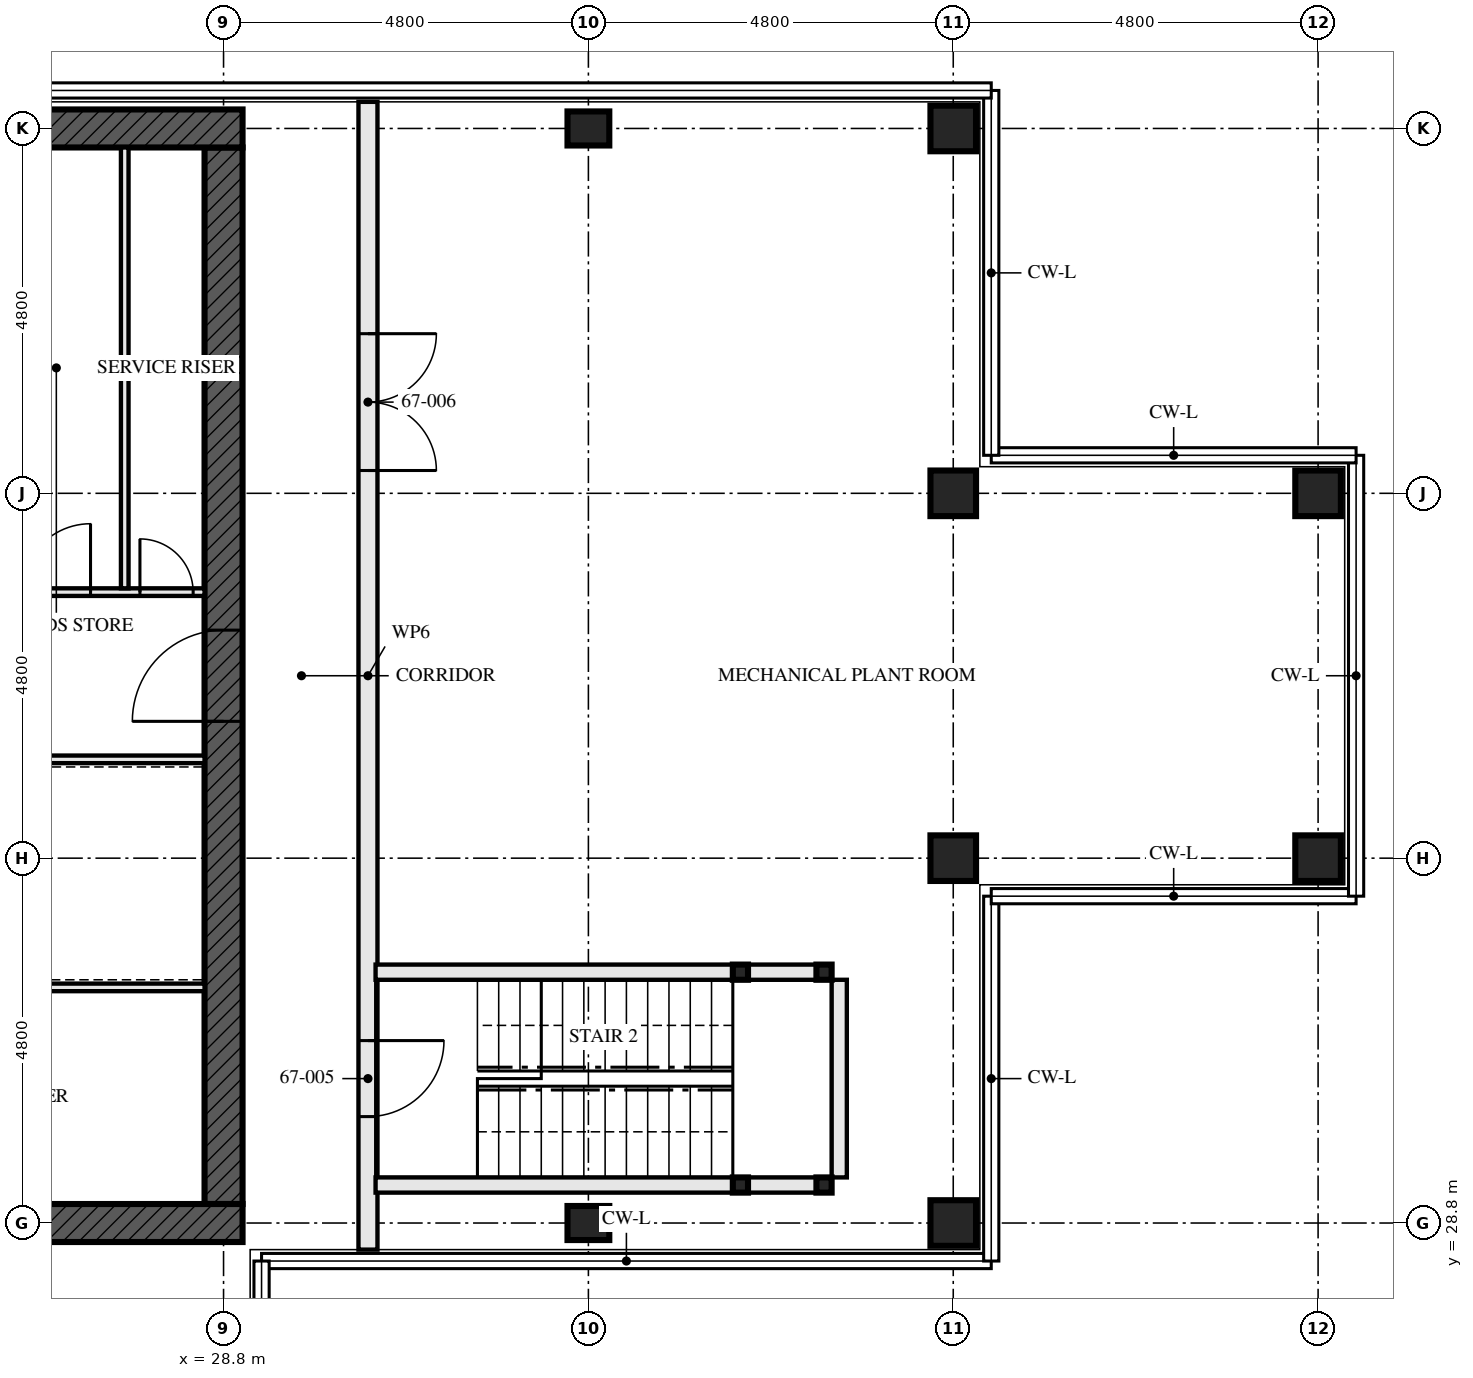
"""IFC4 building model, lengths in metres.
Left out: names, types, materials, properties, quantities, classifications, styles, units other than length and angle.
Written with IfcOpenShell. Run it as: python <this file> out.ifc"""

import sys

from ifc_helpers import new_model, si_unit, direction, frame, frame_2d, origin, origin_2d, place, context, subcontext, project, spatial, rectangle, hollow_rectangle, i_section, extrude, element, fill, save


model = new_model("IFC4")
c1 = context("Model", 3, precision=1e-05, world=origin(), true_north=direction((0.0, 1.0)))
c2 = subcontext(c1, "Body", "Model", "MODEL_VIEW")
j1 = project(units=[si_unit("LENGTHUNIT", "METRE"), si_unit("PLANEANGLEUNIT", "RADIAN")], contexts=[c1])
p1 = place(None, origin())
s1 = spatial("IfcSite", under=j1, at=p1, CompositionType="ELEMENT")
p2 = place(p1, origin())
s2 = spatial("IfcBuilding", under=s1, at=p2, CompositionType="ELEMENT")
p3 = place(p2, frame((0.0, 0.0, 243.5)))
s3 = spatial("IfcBuildingStorey", under=s2, at=p3, CompositionType="ELEMENT", Elevation=243.5)
for number, where, z_axis, x_axis in (
    (1, (33.6, 28.8, 0.0), (0.0, 0.0, 1.0), (0.0, 1.0, 0.0)),
    (2, (33.6, 43.2, 0.0), (0.0, 0.0, 1.0), (0.0, 1.0, 0.0)),
):
    element("IfcColumn", number, at=place(p3, frame(where, z_axis=z_axis, x_axis=x_axis)), inside=s3, PredefinedType="COLUMN", context=c2, shape_type="SweptSolid", body=[
        extrude(i_section(OverallWidth=0.448, OverallDepth=0.55, WebThickness=0.072, FlangeThickness=0.115, FilletRadius=0.015, at=origin_2d()), origin(), (0.0, 0.0, 1.0), 4.5),
    ])
for number, where, z_axis, x_axis in (
    (3, (38.4, 28.8, 0.0), (0.0, 0.0, 1.0), (0.0, 1.0, 0.0)),
    (4, (38.4, 33.6, 0.0), (0.0, 0.0, 1.0), (0.0, 1.0, 0.0)),
    (5, (38.4, 38.4, 0.0), (0.0, 0.0, 1.0), (0.0, 1.0, 0.0)),
    (6, (38.4, 43.2, 0.0), (0.0, 0.0, 1.0), (0.0, 1.0, 0.0)),
    (7, (43.2, 33.6, 0.0), (0.0, 0.0, 1.0), (0.0, 1.0, 0.0)),
    (8, (43.2, 38.4, 0.0), (0.0, 0.0, 1.0), (0.0, 1.0, 0.0)),
):
    element("IfcColumn", number, at=place(p3, frame(where, z_axis=z_axis, x_axis=x_axis)), inside=s3, PredefinedType="COLUMN", context=c2, shape_type="SweptSolid", body=[
        extrude(hollow_rectangle(XDim=0.6, YDim=0.6, WallThickness=0.05, at=origin_2d()), origin(), (0.0, 0.0, 1.0), 4.5),
    ])
p4 = place(p3, frame((14.15, 28.8, -0.25), z_axis=(0.0, 0.0, 1.0), x_axis=(1.0, 0.0, 0.0)))
e9 = element("IfcWall", 9, at=p4, inside=s3, PredefinedType="SHEAR", context=c2, shape_type="SweptSolid", body=[
    extrude(rectangle(XDim=14.9, YDim=0.5, at=frame_2d((7.45, 0.0))), origin(), (0.0, 0.0, 1.0), 4.5),
])
p5 = place(p4, frame((6.85, 0.0, 0.25)))
e10 = element("IfcOpeningElement", 10, at=p5, cuts=e9, PredefinedType="OPENING", context=c2, shape_type="SweptSolid", body=[
    extrude(rectangle(XDim=1.2, YDim=2.1, at=frame_2d((0.6, 1.05))), frame((0.0, 0.26, 0.0), z_axis=(0.0, -1.0, 0.0), x_axis=(1.0, 0.0, 0.0)), (0.0, 0.0, 1.0), 0.521),
])
p6 = place(p3, frame((29.05, 43.2, -0.25), z_axis=(0.0, 0.0, 1.0), x_axis=(-1.0, 0.0, 0.0)))
e11 = element("IfcWall", 11, at=p6, inside=s3, PredefinedType="SHEAR", context=c2, shape_type="SweptSolid", body=[
    extrude(rectangle(XDim=14.9, YDim=0.5, at=frame_2d((7.45, 0.0))), origin(), (0.0, 0.0, 1.0), 4.5),
])
p7 = place(p3, frame((28.8, 29.05, -0.25), z_axis=(0.0, 0.0, 1.0), x_axis=(0.0, 1.0, 0.0)))
e12 = element("IfcWall", 12, at=p7, inside=s3, PredefinedType="SHEAR", context=c2, shape_type="SweptSolid", body=[
    extrude(rectangle(XDim=13.9, YDim=0.5, at=frame_2d((6.95, 0.0))), origin(), (0.0, 0.0, 1.0), 4.5),
])
p8 = place(p7, frame((6.35, 0.0, 0.25)))
e13 = element("IfcOpeningElement", 13, at=p8, cuts=e12, PredefinedType="OPENING", context=c2, shape_type="SweptSolid", body=[
    extrude(rectangle(XDim=1.2, YDim=2.1, at=frame_2d((0.6, 1.05))), frame((0.0, 0.26, 0.0), z_axis=(0.0, -1.0, 0.0), x_axis=(1.0, 0.0, 0.0)), (0.0, 0.0, 1.0), 0.521),
])
for number, where, z_axis, x_axis in (
    (14, (36.7, 29.3, 0.0), (0.0, 0.0, 1.0), (1.0, 0.0, 0.0)),
    (15, (36.7, 32.1, 0.0), (0.0, 0.0, 1.0), (1.0, 0.0, 0.0)),
    (16, (35.6, 29.3, 0.0), (0.0, 0.0, 1.0), (1.0, 0.0, 0.0)),
    (17, (35.6, 32.1, 0.0), (0.0, 0.0, 1.0), (1.0, 0.0, 0.0)),
):
    element("IfcColumn", number, at=place(p3, frame(where, z_axis=z_axis, x_axis=x_axis)), inside=s3, PredefinedType="COLUMN", context=c2, shape_type="SweptSolid", body=[
        extrude(hollow_rectangle(XDim=0.2, YDim=0.2, WallThickness=0.008, at=origin_2d()), origin(), (0.0, 0.0, 1.0), 4.25),
    ])
p9 = place(p3, frame((36.6, 29.3, 0.0), z_axis=(0.0, 0.0, 1.0), x_axis=(-1.0, 0.0, 0.0)))
e18 = element("IfcWall", 18, at=p9, inside=s3, PredefinedType="SOLIDWALL", context=c2, shape_type="SweptSolid", body=[
    extrude(rectangle(XDim=0.9, YDim=0.2, at=frame_2d((0.45, 0.0))), origin(), (0.0, 0.0, 1.0), 4.25),
])
p10 = place(p3, frame((35.5, 29.3, 0.0), z_axis=(0.0, 0.0, 1.0), x_axis=(-1.0, 0.0, 0.0)))
e19 = element("IfcWall", 19, at=p10, inside=s3, PredefinedType="SOLIDWALL", context=c2, shape_type="SweptSolid", body=[
    extrude(rectangle(XDim=4.7, YDim=0.2, at=frame_2d((2.35, 0.0))), origin(), (0.0, 0.0, 1.0), 4.25),
])
p11 = place(p3, frame((36.6, 32.1, 0.0), z_axis=(0.0, 0.0, 1.0), x_axis=(-1.0, 0.0, 0.0)))
e20 = element("IfcWall", 20, at=p11, inside=s3, PredefinedType="SOLIDWALL", context=c2, shape_type="SweptSolid", body=[
    extrude(rectangle(XDim=0.9, YDim=0.2, at=frame_2d((0.45, 0.0))), origin(), (0.0, 0.0, 1.0), 4.25),
])
p12 = place(p3, frame((35.5, 32.1, 0.0), z_axis=(0.0, 0.0, 1.0), x_axis=(-1.0, 0.0, 0.0)))
e21 = element("IfcWall", 21, at=p12, inside=s3, PredefinedType="SOLIDWALL", context=c2, shape_type="SweptSolid", body=[
    extrude(rectangle(XDim=4.7, YDim=0.2, at=frame_2d((2.35, 0.0))), origin(), (0.0, 0.0, 1.0), 4.25),
])
p13 = place(p3, frame((36.9, 29.4, 0.0), z_axis=(0.0, 0.0, 1.0), x_axis=(0.0, 1.0, 0.0)))
e22 = element("IfcWall", 22, at=p13, inside=s3, PredefinedType="SOLIDWALL", context=c2, shape_type="SweptSolid", body=[
    extrude(rectangle(XDim=2.6, YDim=0.2, at=frame_2d((1.3, 0.0))), origin(), (0.0, 0.0, 1.0), 4.25),
])
p14 = place(p3, frame((30.7, 28.45, 0.0), z_axis=(0.0, 0.0, 1.0), x_axis=(0.0, 1.0, 0.0)))
e23 = element("IfcWall", 23, at=p14, inside=s3, PredefinedType="SOLIDWALL", context=c2, shape_type="SweptSolid", body=[
    extrude(rectangle(XDim=15.1, YDim=0.25, at=frame_2d((7.55, 0.0))), origin(), (0.0, 0.0, 1.0), 3.232),
])
p15 = place(p14, frame((1.75, 0.0, 0.0)))
e24 = element("IfcOpeningElement", 24, at=p15, cuts=e23, PredefinedType="OPENING", context=c2, shape_type="SweptSolid", body=[
    extrude(rectangle(XDim=1.0, YDim=2.1, at=frame_2d((0.5, 1.05))), frame((0.0, 0.135, 0.0), z_axis=(0.0, -1.0, 0.0), x_axis=(1.0, 0.0, 0.0)), (0.0, 0.0, 1.0), 0.271),
])
p16 = place(p14, frame((10.25, 0.0, 0.0)))
e25 = element("IfcOpeningElement", 25, at=p16, cuts=e23, PredefinedType="OPENING", context=c2, shape_type="SweptSolid", body=[
    extrude(rectangle(XDim=1.8, YDim=2.4, at=frame_2d((0.9, 1.2))), frame((0.0, 0.135, 0.0), z_axis=(0.0, -1.0, 0.0), x_axis=(1.0, 0.0, 0.0)), (0.0, 0.0, 1.0), 0.271),
])
p17 = place(p3, frame((27.5, 37.15, 0.0), z_axis=(0.0, 0.0, 1.0), x_axis=(0.0, 1.0, 0.0)))
e26 = element("IfcWall", 26, at=p17, inside=s3, PredefinedType="SOLIDWALL", context=c2, shape_type="SweptSolid", body=[
    extrude(rectangle(XDim=5.8, YDim=0.1, at=frame_2d((2.9, 0.0))), origin(), (0.0, 0.0, 1.0), 4.25),
])
p18 = place(p3, frame((23.05, 34.9, 0.0), z_axis=(0.0, 0.0, 1.0), x_axis=(1.0, 0.0, 0.0)))
e27 = element("IfcWall", 27, at=p18, inside=s3, PredefinedType="SOLIDWALL", context=c2, shape_type="SweptSolid", body=[
    extrude(rectangle(XDim=5.5, YDim=0.1, at=frame_2d((2.75, 0.0))), origin(), (0.0, 0.0, 1.0), 4.25),
])
p19 = place(p3, frame((22.65, 37.1, 0.0), z_axis=(0.0, 0.0, 1.0), x_axis=(1.0, 0.0, 0.0)))
e28 = element("IfcWall", 28, at=p19, inside=s3, PredefinedType="SOLIDWALL", context=c2, shape_type="SweptSolid", body=[
    extrude(rectangle(XDim=5.9, YDim=0.1, at=frame_2d((2.95, 0.0))), origin(), (0.0, 0.0, 1.0), 4.25),
])
p20 = place(p19, frame((3.5, 0.0, 0.0)))
e29 = element("IfcOpeningElement", 29, at=p20, cuts=e28, PredefinedType="OPENING", context=c2, shape_type="SweptSolid", body=[
    extrude(rectangle(XDim=0.9, YDim=2.1, at=frame_2d((0.45, 1.05))), frame((0.0, 0.061, 0.0), z_axis=(0.0, -1.0, 0.0), x_axis=(1.0, 0.0, 0.0)), (0.0, 0.0, 1.0), 0.121),
])
p21 = place(p19, frame((5.05, 0.0, 0.0)))
e30 = element("IfcOpeningElement", 30, at=p21, cuts=e28, PredefinedType="OPENING", context=c2, shape_type="SweptSolid", body=[
    extrude(rectangle(XDim=0.7, YDim=2.1, at=frame_2d((0.35, 1.05))), frame((0.0, 0.061, 0.0), z_axis=(0.0, -1.0, 0.0), x_axis=(1.0, 0.0, 0.0)), (0.0, 0.0, 1.0), 0.121),
])
p22 = place(p3, frame((23.15, 31.9, 0.0), z_axis=(0.0, 0.0, 1.0), x_axis=(1.0, 0.0, 0.0)))
e31 = element("IfcWall", 31, at=p22, inside=s3, PredefinedType="SOLIDWALL", context=c2, shape_type="SweptSolid", body=[
    extrude(rectangle(XDim=5.4, YDim=0.1, at=frame_2d((2.7, 0.0))), origin(), (0.0, 0.0, 1.0), 4.25),
])
p23 = place(p15, frame((1.0, 0.0, 0.0), z_axis=(0.0, 0.0, 1.0), x_axis=(-1.0, 0.0, 0.0)))
e32 = element("IfcDoor", 32, at=p23, inside=s3, OperationType="SINGLE_SWING_RIGHT", PredefinedType="DOOR", context=c2, shape_type="SweptSolid", body=[
    extrude(rectangle(XDim=1.0, YDim=2.1, at=frame_2d((0.5, 1.05))), frame((0.0, 0.032, 0.0), z_axis=(0.0, -1.0, 0.0), x_axis=(1.0, 0.0, 0.0)), (0.0, 0.0, 1.0), 0.064),
])
fill(e24, e32)
p24 = place(p16, frame((1.8, 0.0, 0.0), z_axis=(0.0, 0.0, 1.0), x_axis=(-1.0, 0.0, 0.0)))
e33 = element("IfcDoor", 33, at=p24, inside=s3, OperationType="DOUBLE_DOOR_SINGLE_SWING", PredefinedType="DOOR", context=c2, shape_type="SweptSolid", body=[
    extrude(rectangle(XDim=1.8, YDim=2.4, at=frame_2d((0.9, 1.2))), frame((0.0, 0.032, 0.0), z_axis=(0.0, -1.0, 0.0), x_axis=(1.0, 0.0, 0.0)), (0.0, 0.0, 1.0), 0.064),
])
fill(e25, e33)
p25 = place(p20, origin())
e34 = element("IfcDoor", 34, at=p25, inside=s3, OperationType="SINGLE_SWING_LEFT", PredefinedType="DOOR", context=c2, shape_type="SweptSolid", body=[
    extrude(rectangle(XDim=0.9, YDim=2.1, at=frame_2d((0.45, 1.05))), frame((0.0, 0.027, 0.0), z_axis=(0.0, -1.0, 0.0), x_axis=(1.0, 0.0, 0.0)), (0.0, 0.0, 1.0), 0.054),
])
fill(e29, e34)
p26 = place(p21, origin())
e35 = element("IfcDoor", 35, at=p26, inside=s3, OperationType="SINGLE_SWING_RIGHT", PredefinedType="DOOR", context=c2, shape_type="SweptSolid", body=[
    extrude(rectangle(XDim=0.7, YDim=2.1, at=frame_2d((0.35, 1.05))), frame((0.0, 0.027, 0.0), z_axis=(0.0, -1.0, 0.0), x_axis=(1.0, 0.0, 0.0)), (0.0, 0.0, 1.0), 0.054),
])
fill(e30, e35)
p27 = place(p8, origin())
e36 = element("IfcDoor", 36, at=p27, inside=s3, OperationType="SINGLE_SWING_LEFT", PredefinedType="DOOR", context=c2, shape_type="SweptSolid", body=[
    extrude(rectangle(XDim=1.2, YDim=2.1, at=frame_2d((0.6, 1.05))), frame((0.0, 0.027, 0.0), z_axis=(0.0, -1.0, 0.0), x_axis=(1.0, 0.0, 0.0)), (0.0, 0.0, 1.0), 0.054),
])
fill(e13, e36)
save(model, sys.argv[1])
